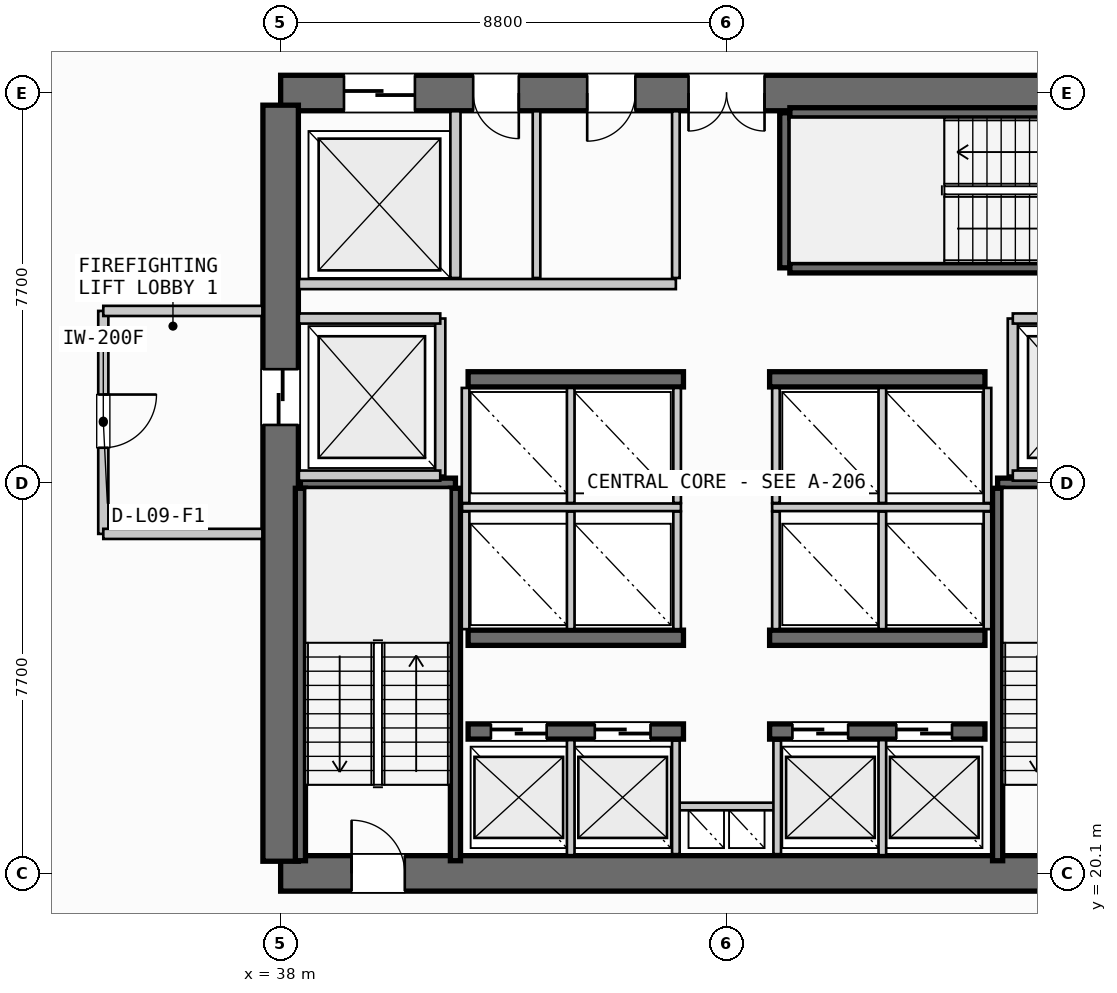
"""IFC4 building model, lengths in metres.
Left out: names, types, materials, properties, quantities, classifications, styles, units other than length and angle.
Written with IfcOpenShell. Run it as: python <this file> out.ifc"""

import sys

from ifc_helpers import new_model, si_unit, direction, frame, frame_2d, origin, place, context, subcontext, project, spatial, rectangle, extrude, source, transform, mapped, element, fill, save


model = new_model("IFC4")
c1 = context("Model", 3, precision=1e-05, world=origin(), true_north=direction((0.0, 1.0)))
c2 = subcontext(c1, "Body", "Model", "MODEL_VIEW")
j1 = project(units=[si_unit("LENGTHUNIT", "METRE"), si_unit("PLANEANGLEUNIT", "RADIAN")], contexts=[c1])
p1 = place(None, origin())
s1 = spatial("IfcSite", under=j1, at=p1, CompositionType="ELEMENT")
p2 = place(p1, origin())
s2 = spatial("IfcBuilding", under=s1, at=p2, CompositionType="ELEMENT")
p3 = place(p2, frame((0.0, 0.0, 41.0)))
s3 = spatial("IfcBuildingStorey", under=s2, at=p3, CompositionType="ELEMENT", Elevation=41.0)
p4 = place(p3, frame((38.0, 20.1, 0.0), z_axis=(0.0, 0.0, 1.0), x_axis=(1.0, 0.0, 0.0)))
e1 = element("IfcWall", 1, at=p4, inside=s3, PredefinedType="SHEAR", context=c2, shape_type="SweptSolid", body=[
    extrude(rectangle(XDim=17.6, YDim=0.7, at=frame_2d((8.8, 0.0))), origin(), (0.0, 0.0, 1.0), 3.55),
])
p5 = place(p4, frame((1.4, 0.0, 0.0)))
e2 = element("IfcOpeningElement", 2, at=p5, cuts=e1, PredefinedType="OPENING", context=c2, shape_type="SweptSolid", body=[
    extrude(rectangle(XDim=1.05, YDim=2.15, at=frame_2d((0.525, 1.075))), frame((0.0, 0.36, 0.0), z_axis=(0.0, -1.0, 0.0), x_axis=(1.0, 0.0, 0.0)), (0.0, 0.0, 1.0), 0.72),
])
p6 = place(p4, frame((15.15, 0.0, 0.0)))
e3 = element("IfcOpeningElement", 3, at=p6, cuts=e1, PredefinedType="OPENING", context=c2, shape_type="SweptSolid", body=[
    extrude(rectangle(XDim=1.05, YDim=2.15, at=frame_2d((0.525, 1.075))), frame((0.0, 0.36, 0.0), z_axis=(0.0, -1.0, 0.0), x_axis=(1.0, 0.0, 0.0)), (0.0, 0.0, 1.0), 0.72),
])
p7 = place(p3, frame((55.6, 35.5, 0.0), z_axis=(0.0, 0.0, 1.0), x_axis=(-1.0, 0.0, 0.0)))
e4 = element("IfcWall", 4, at=p7, inside=s3, PredefinedType="SHEAR", context=c2, shape_type="SweptSolid", body=[
    extrude(rectangle(XDim=17.6, YDim=0.7, at=frame_2d((8.8, 0.0))), origin(), (0.0, 0.0, 1.0), 3.55),
])
p8 = place(p7, frame((8.05, 0.0, 0.0)))
e5 = element("IfcOpeningElement", 5, at=p8, cuts=e4, PredefinedType="OPENING", context=c2, shape_type="SweptSolid", body=[
    extrude(rectangle(XDim=1.5, YDim=2.2, at=frame_2d((0.75, 1.1))), frame((0.0, 0.36, 0.0), z_axis=(0.0, -1.0, 0.0), x_axis=(1.0, 0.0, 0.0)), (0.0, 0.0, 1.0), 0.72),
])
p9 = place(p7, frame((14.95, 0.0, 0.0)))
e6 = element("IfcOpeningElement", 6, at=p9, cuts=e4, PredefinedType="OPENING", context=c2, shape_type="SweptSolid", body=[
    extrude(rectangle(XDim=1.4, YDim=2.3, at=frame_2d((0.7, 1.15))), frame((0.0, 0.36, 0.0), z_axis=(0.0, -1.0, 0.0), x_axis=(1.0, 0.0, 0.0)), (0.0, 0.0, 1.0), 0.72),
])
p10 = place(p7, frame((12.9, 0.0, 0.0)))
e7 = element("IfcOpeningElement", 7, at=p10, cuts=e4, PredefinedType="OPENING", context=c2, shape_type="SweptSolid", body=[
    extrude(rectangle(XDim=0.9, YDim=2.15, at=frame_2d((0.45, 1.075))), frame((0.0, 0.36, 0.0), z_axis=(0.0, -1.0, 0.0), x_axis=(1.0, 0.0, 0.0)), (0.0, 0.0, 1.0), 0.72),
])
p11 = place(p7, frame((10.6, 0.0, 0.0)))
e8 = element("IfcOpeningElement", 8, at=p11, cuts=e4, PredefinedType="OPENING", context=c2, shape_type="SweptSolid", body=[
    extrude(rectangle(XDim=0.95, YDim=2.15, at=frame_2d((0.475, 1.075))), frame((0.0, 0.36, 0.0), z_axis=(0.0, -1.0, 0.0), x_axis=(1.0, 0.0, 0.0)), (0.0, 0.0, 1.0), 0.72),
])
p12 = place(p3, frame((38.0, 35.26, 0.0), z_axis=(0.0, 0.0, 1.0), x_axis=(0.0, -1.0, 0.0)))
e9 = element("IfcWall", 9, at=p12, inside=s3, PredefinedType="SHEAR", context=c2, shape_type="SweptSolid", body=[
    extrude(rectangle(XDim=14.92, YDim=0.7, at=frame_2d((7.46, 0.0))), origin(), (0.0, 0.0, 1.0), 3.55),
])
p13 = place(p12, frame((5.21, 0.0, 0.0)))
e10 = element("IfcOpeningElement", 10, at=p13, cuts=e9, PredefinedType="OPENING", context=c2, shape_type="SweptSolid", body=[
    extrude(rectangle(XDim=1.1, YDim=2.2, at=frame_2d((0.55, 1.1))), frame((0.0, 0.36, 0.0), z_axis=(0.0, -1.0, 0.0), x_axis=(1.0, 0.0, 0.0)), (0.0, 0.0, 1.0), 0.72),
])
p14 = place(p3, frame((41.7, 22.9, 0.0), z_axis=(0.0, 0.0, 1.0), x_axis=(1.0, 0.0, 0.0)))
e11 = element("IfcWall", 11, at=p14, inside=s3, PredefinedType="SHEAR", context=c2, shape_type="SweptSolid", body=[
    extrude(rectangle(XDim=4.25, YDim=0.3, at=frame_2d((2.125, 0.0))), origin(), (0.0, 0.0, 1.0), 3.55),
])
p15 = place(p14, frame((0.45, 0.0, 0.0)))
e12 = element("IfcOpeningElement", 12, at=p15, cuts=e11, PredefinedType="OPENING", context=c2, shape_type="SweptSolid", body=[
    extrude(rectangle(XDim=1.1, YDim=2.2, at=frame_2d((0.55, 1.1))), frame((0.0, 0.16, 0.0), z_axis=(0.0, -1.0, 0.0), x_axis=(1.0, 0.0, 0.0)), (0.0, 0.0, 1.0), 0.32),
])
p16 = place(p14, frame((2.5, 0.0, 0.0)))
e13 = element("IfcOpeningElement", 13, at=p16, cuts=e11, PredefinedType="OPENING", context=c2, shape_type="SweptSolid", body=[
    extrude(rectangle(XDim=1.1, YDim=2.2, at=frame_2d((0.55, 1.1))), frame((0.0, 0.16, 0.0), z_axis=(0.0, -1.0, 0.0), x_axis=(1.0, 0.0, 0.0)), (0.0, 0.0, 1.0), 0.32),
])
p17 = place(p3, frame((47.65, 22.9, 0.0), z_axis=(0.0, 0.0, 1.0), x_axis=(1.0, 0.0, 0.0)))
e14 = element("IfcWall", 14, at=p17, inside=s3, PredefinedType="SHEAR", context=c2, shape_type="SweptSolid", body=[
    extrude(rectangle(XDim=4.25, YDim=0.3, at=frame_2d((2.125, 0.0))), origin(), (0.0, 0.0, 1.0), 3.55),
])
p18 = place(p17, frame((0.45, 0.0, 0.0)))
e15 = element("IfcOpeningElement", 15, at=p18, cuts=e14, PredefinedType="OPENING", context=c2, shape_type="SweptSolid", body=[
    extrude(rectangle(XDim=1.1, YDim=2.2, at=frame_2d((0.55, 1.1))), frame((0.0, 0.16, 0.0), z_axis=(0.0, -1.0, 0.0), x_axis=(1.0, 0.0, 0.0)), (0.0, 0.0, 1.0), 0.32),
])
p19 = place(p17, frame((2.5, 0.0, 0.0)))
e16 = element("IfcOpeningElement", 16, at=p19, cuts=e14, PredefinedType="OPENING", context=c2, shape_type="SweptSolid", body=[
    extrude(rectangle(XDim=1.1, YDim=2.2, at=frame_2d((0.55, 1.1))), frame((0.0, 0.16, 0.0), z_axis=(0.0, -1.0, 0.0), x_axis=(1.0, 0.0, 0.0)), (0.0, 0.0, 1.0), 0.32),
])
for number, where, z_axis, x_axis in (
    (17, (41.7, 24.75, 0.0), (0.0, 0.0, 1.0), (1.0, 0.0, 0.0)),
    (18, (47.65, 24.75, 0.0), (0.0, 0.0, 1.0), (1.0, 0.0, 0.0)),
    (19, (41.7, 29.85, 0.0), (0.0, 0.0, 1.0), (1.0, 0.0, 0.0)),
    (20, (47.65, 29.85, 0.0), (0.0, 0.0, 1.0), (1.0, 0.0, 0.0)),
):
    element("IfcWall", number, at=place(p3, frame(where, z_axis=z_axis, x_axis=x_axis)), inside=s3, PredefinedType="SHEAR", context=c2, shape_type="SweptSolid", body=[
        extrude(rectangle(XDim=4.25, YDim=0.3, at=frame_2d((2.125, 0.0))), origin(), (0.0, 0.0, 1.0), 3.55),
    ])
p20 = place(p3, frame((38.39, 27.8, 0.0), z_axis=(0.0, 0.0, 1.0), x_axis=(1.0, 0.0, 0.0)))
e21 = element("IfcWall", 21, at=p20, inside=s3, PredefinedType="SHEAR", context=c2, shape_type="SweptSolid", body=[
    extrude(rectangle(XDim=3.06, YDim=0.2, at=frame_2d((1.53, 0.0))), origin(), (0.0, 0.0, 1.0), 3.55),
])
for number, where, z_axis, x_axis in (
    (22, (41.45, 27.7, 0.0), (0.0, 0.0, 1.0), (0.0, -1.0, 0.0)),
    (23, (38.39, 20.35, 0.0), (0.0, 0.0, 1.0), (0.0, 1.0, 0.0)),
):
    element("IfcWall", number, at=place(p3, frame(where, z_axis=z_axis, x_axis=x_axis)), inside=s3, PredefinedType="SHEAR", context=c2, shape_type="SweptSolid", body=[
        extrude(rectangle(XDim=7.35, YDim=0.2, at=frame_2d((3.675, 0.0))), origin(), (0.0, 0.0, 1.0), 3.55),
    ])
p21 = place(p3, frame((52.15, 27.8, 0.0), z_axis=(0.0, 0.0, 1.0), x_axis=(1.0, 0.0, 0.0)))
e24 = element("IfcWall", 24, at=p21, inside=s3, PredefinedType="SHEAR", context=c2, shape_type="SweptSolid", body=[
    extrude(rectangle(XDim=3.06, YDim=0.2, at=frame_2d((1.53, 0.0))), origin(), (0.0, 0.0, 1.0), 3.55),
])
p22 = place(p3, frame((52.15, 20.35, 0.0), z_axis=(0.0, 0.0, 1.0), x_axis=(0.0, 1.0, 0.0)))
e25 = element("IfcWall", 25, at=p22, inside=s3, PredefinedType="SHEAR", context=c2, shape_type="SweptSolid", body=[
    extrude(rectangle(XDim=7.35, YDim=0.2, at=frame_2d((3.675, 0.0))), origin(), (0.0, 0.0, 1.0), 3.55),
])
p23 = place(p3, frame((47.95, 32.05, 0.0), z_axis=(0.0, 0.0, 1.0), x_axis=(0.0, 1.0, 0.0)))
e26 = element("IfcWall", 26, at=p23, inside=s3, PredefinedType="SHEAR", context=c2, shape_type="SweptSolid", body=[
    extrude(rectangle(XDim=3.06, YDim=0.2, at=frame_2d((1.53, 0.0))), origin(), (0.0, 0.0, 1.0), 3.55),
])
for number, where, z_axis, x_axis in (
    (27, (48.05, 35.11, 0.0), (0.0, 0.0, 1.0), (1.0, 0.0, 0.0)),
    (28, (55.4, 32.05, 0.0), (0.0, 0.0, 1.0), (-1.0, 0.0, 0.0)),
):
    element("IfcWall", number, at=place(p3, frame(where, z_axis=z_axis, x_axis=x_axis)), inside=s3, PredefinedType="SHEAR", context=c2, shape_type="SweptSolid", body=[
        extrude(rectangle(XDim=7.35, YDim=0.2, at=frame_2d((3.675, 0.0))), origin(), (0.0, 0.0, 1.0), 3.55),
    ])
p24 = place(p3, frame((45.8, 21.42, 0.0), z_axis=(0.0, 0.0, 1.0), x_axis=(1.0, 0.0, 0.0)))
e29 = element("IfcWall", 29, at=p24, inside=s3, PredefinedType="PARTITIONING", context=c2, shape_type="SweptSolid", body=[
    extrude(rectangle(XDim=2.0, YDim=0.15, at=frame_2d((1.0, 0.0))), origin(), (0.0, 0.0, 1.0), 2.785),
])
for number, where, z_axis, x_axis in (
    (30, (45.8, 20.48, 0.0), (0.0, 0.0, 1.0), (0.0, 1.0, 0.0)),
    (31, (47.8, 20.48, 0.0), (0.0, 0.0, 1.0), (0.0, 1.0, 0.0)),
):
    element("IfcWall", number, at=place(p3, frame(where, z_axis=z_axis, x_axis=x_axis)), inside=s3, PredefinedType="PARTITIONING", context=c2, shape_type="SweptSolid", body=[
        extrude(rectangle(XDim=2.24, YDim=0.15, at=frame_2d((1.12, 0.0))), origin(), (0.0, 0.0, 1.0), 2.785),
    ])
p25 = place(p3, frame((41.15, 27.95, 0.0), z_axis=(0.0, 0.0, 1.0), x_axis=(0.0, 1.0, 0.0)))
e32 = element("IfcWall", 32, at=p25, inside=s3, PredefinedType="PARTITIONING", context=c2, shape_type="SweptSolid", body=[
    extrude(rectangle(XDim=3.1, YDim=0.2, at=frame_2d((1.55, 0.0))), origin(), (0.0, 0.0, 1.0), 2.785),
])
for number, where, z_axis, x_axis in (
    (33, (38.36, 27.95, 0.0), (0.0, 0.0, 1.0), (1.0, 0.0, 0.0)),
    (34, (38.36, 31.05, 0.0), (0.0, 0.0, 1.0), (1.0, 0.0, 0.0)),
):
    element("IfcWall", number, at=place(p3, frame(where, z_axis=z_axis, x_axis=x_axis)), inside=s3, PredefinedType="PARTITIONING", context=c2, shape_type="SweptSolid", body=[
        extrude(rectangle(XDim=2.79, YDim=0.2, at=frame_2d((1.395, 0.0))), origin(), (0.0, 0.0, 1.0), 2.785),
    ])
p26 = place(p3, frame((34.5, 31.2, 0.0), z_axis=(0.0, 0.0, 1.0), x_axis=(0.0, -1.0, 0.0)))
e35 = element("IfcWall", 35, at=p26, inside=s3, PredefinedType="PARTITIONING", context=c2, shape_type="SweptSolid", body=[
    extrude(rectangle(XDim=4.4, YDim=0.2, at=frame_2d((2.2, 0.0))), origin(), (0.0, 0.0, 1.0), 2.785),
])
p27 = place(p26, frame((1.65, 0.0, 0.0)))
e36 = element("IfcOpeningElement", 36, at=p27, cuts=e35, PredefinedType="OPENING", context=c2, shape_type="SweptSolid", body=[
    extrude(rectangle(XDim=1.05, YDim=2.15, at=frame_2d((0.525, 1.075))), frame((0.0, 0.11, 0.0), z_axis=(0.0, -1.0, 0.0), x_axis=(1.0, 0.0, 0.0)), (0.0, 0.0, 1.0), 0.22),
])
for number, where, z_axis, x_axis in (
    (37, (34.5, 26.8, 0.0), (0.0, 0.0, 1.0), (1.0, 0.0, 0.0)),
    (38, (34.5, 31.2, 0.0), (0.0, 0.0, 1.0), (1.0, 0.0, 0.0)),
):
    element("IfcWall", number, at=place(p3, frame(where, z_axis=z_axis, x_axis=x_axis)), inside=s3, PredefinedType="PARTITIONING", context=c2, shape_type="SweptSolid", body=[
        extrude(rectangle(XDim=3.14, YDim=0.2, at=frame_2d((1.57, 0.0))), origin(), (0.0, 0.0, 1.0), 2.785),
    ])
p28 = place(p3, frame((52.45, 27.95, 0.0), z_axis=(0.0, 0.0, 1.0), x_axis=(0.0, 1.0, 0.0)))
e39 = element("IfcWall", 39, at=p28, inside=s3, PredefinedType="PARTITIONING", context=c2, shape_type="SweptSolid", body=[
    extrude(rectangle(XDim=3.1, YDim=0.2, at=frame_2d((1.55, 0.0))), origin(), (0.0, 0.0, 1.0), 2.785),
])
for number, where, z_axis, x_axis in (
    (40, (52.45, 27.95, 0.0), (0.0, 0.0, 1.0), (1.0, 0.0, 0.0)),
    (41, (52.45, 31.05, 0.0), (0.0, 0.0, 1.0), (1.0, 0.0, 0.0)),
):
    element("IfcWall", number, at=place(p3, frame(where, z_axis=z_axis, x_axis=x_axis)), inside=s3, PredefinedType="PARTITIONING", context=c2, shape_type="SweptSolid", body=[
        extrude(rectangle(XDim=2.79, YDim=0.2, at=frame_2d((1.395, 0.0))), origin(), (0.0, 0.0, 1.0), 2.785),
    ])
for number, where, z_axis, x_axis in (
    (42, (43.725, 20.46, 0.0), (0.0, 0.0, 1.0), (0.0, 1.0, 0.0)),
    (43, (49.875, 20.46, 0.0), (0.0, 0.0, 1.0), (0.0, 1.0, 0.0)),
):
    element("IfcWall", number, at=place(p3, frame(where, z_axis=z_axis, x_axis=x_axis)), inside=s3, PredefinedType="PARTITIONING", context=c2, shape_type="SweptSolid", body=[
        extrude(rectangle(XDim=2.27, YDim=0.15, at=frame_2d((1.135, 0.0))), origin(), (0.0, 0.0, 1.0), 2.785),
    ])
p29 = place(p3, frame((41.58, 27.325, 0.0), z_axis=(0.0, 0.0, 1.0), x_axis=(1.0, 0.0, 0.0)))
e44 = element("IfcWall", 44, at=p29, inside=s3, PredefinedType="PARTITIONING", context=c2, shape_type="SweptSolid", body=[
    extrude(rectangle(XDim=4.32, YDim=0.15, at=frame_2d((2.16, 0.0))), origin(), (0.0, 0.0, 1.0), 2.785),
])
p30 = place(p3, frame((47.7, 27.325, 0.0), z_axis=(0.0, 0.0, 1.0), x_axis=(1.0, 0.0, 0.0)))
e45 = element("IfcWall", 45, at=p30, inside=s3, PredefinedType="PARTITIONING", context=c2, shape_type="SweptSolid", body=[
    extrude(rectangle(XDim=4.32, YDim=0.15, at=frame_2d((2.16, 0.0))), origin(), (0.0, 0.0, 1.0), 2.785),
])
for number, where, z_axis, x_axis in (
    (46, (41.65, 24.92, 0.0), (0.0, 0.0, 1.0), (0.0, 1.0, 0.0)),
    (47, (43.725, 24.92, 0.0), (0.0, 0.0, 1.0), (0.0, 1.0, 0.0)),
    (48, (45.825, 24.92, 0.0), (0.0, 0.0, 1.0), (0.0, 1.0, 0.0)),
    (49, (47.775, 24.92, 0.0), (0.0, 0.0, 1.0), (0.0, 1.0, 0.0)),
    (50, (49.875, 24.92, 0.0), (0.0, 0.0, 1.0), (0.0, 1.0, 0.0)),
    (51, (51.95, 24.92, 0.0), (0.0, 0.0, 1.0), (0.0, 1.0, 0.0)),
):
    element("IfcWall", number, at=place(p3, frame(where, z_axis=z_axis, x_axis=x_axis)), inside=s3, PredefinedType="PARTITIONING", context=c2, shape_type="SweptSolid", body=[
        extrude(rectangle(XDim=2.32, YDim=0.15, at=frame_2d((1.16, 0.0))), origin(), (0.0, 0.0, 1.0), 2.785),
    ])
for number, where, z_axis, x_axis in (
    (52, (41.65, 27.41, 0.0), (0.0, 0.0, 1.0), (0.0, 1.0, 0.0)),
    (53, (43.725, 27.41, 0.0), (0.0, 0.0, 1.0), (0.0, 1.0, 0.0)),
    (54, (45.825, 27.41, 0.0), (0.0, 0.0, 1.0), (0.0, 1.0, 0.0)),
    (55, (47.775, 27.41, 0.0), (0.0, 0.0, 1.0), (0.0, 1.0, 0.0)),
    (56, (49.875, 27.41, 0.0), (0.0, 0.0, 1.0), (0.0, 1.0, 0.0)),
    (57, (51.95, 27.41, 0.0), (0.0, 0.0, 1.0), (0.0, 1.0, 0.0)),
):
    element("IfcWall", number, at=place(p3, frame(where, z_axis=z_axis, x_axis=x_axis)), inside=s3, PredefinedType="PARTITIONING", context=c2, shape_type="SweptSolid", body=[
        extrude(rectangle(XDim=2.27, YDim=0.15, at=frame_2d((1.135, 0.0))), origin(), (0.0, 0.0, 1.0), 2.785),
    ])
p31 = place(p3, frame((41.45, 31.85, 0.0), z_axis=(0.0, 0.0, 1.0), x_axis=(0.0, 1.0, 0.0)))
e58 = element("IfcWall", 58, at=p31, inside=s3, PredefinedType="PARTITIONING", context=c2, shape_type="SweptSolid", body=[
    extrude(rectangle(XDim=3.29, YDim=0.2, at=frame_2d((1.645, 0.0))), origin(), (0.0, 0.0, 1.0), 2.785),
])
p32 = place(p3, frame((38.36, 31.73, 0.0), z_axis=(0.0, 0.0, 1.0), x_axis=(1.0, 0.0, 0.0)))
e59 = element("IfcWall", 59, at=p32, inside=s3, PredefinedType="PARTITIONING", context=c2, shape_type="SweptSolid", body=[
    extrude(rectangle(XDim=7.44, YDim=0.2, at=frame_2d((3.72, 0.0))), origin(), (0.0, 0.0, 1.0), 2.785),
])
p33 = place(p3, frame((45.8, 31.85, 0.0), z_axis=(0.0, 0.0, 1.0), x_axis=(0.0, 1.0, 0.0)))
e60 = element("IfcWall", 60, at=p33, inside=s3, PredefinedType="PARTITIONING", context=c2, shape_type="SweptSolid", body=[
    extrude(rectangle(XDim=3.29, YDim=0.15, at=frame_2d((1.645, 0.0))), origin(), (0.0, 0.0, 1.0), 2.785),
])
p34 = place(p3, frame((43.05, 31.85, 0.0), z_axis=(0.0, 0.0, 1.0), x_axis=(0.0, 1.0, 0.0)))
e61 = element("IfcWall", 61, at=p34, inside=s3, PredefinedType="PLUMBINGWALL", context=c2, shape_type="SweptSolid", body=[
    extrude(rectangle(XDim=3.29, YDim=0.15, at=frame_2d((1.645, 0.0))), origin(), (0.0, 0.0, 1.0), 2.785),
])
m1 = source(origin(), c2, "Body", "SweptSolid", [
    extrude(rectangle(XDim=1.05, YDim=2.15, at=frame_2d((0.525, 1.075))), frame((0.0, 0.025, 0.0), z_axis=(0.0, -1.0, 0.0), x_axis=(1.0, 0.0, 0.0)), (0.0, 0.0, 1.0), 0.05),
])
p35 = place(p5, origin())
e62 = element("IfcDoor", 62, at=p35, inside=s3, OperationType="SINGLE_SWING_LEFT", PredefinedType="DOOR", context=c2, shape_type="MappedRepresentation", body=[
    mapped(m1, transform((0.0, 0.0, 0.0), scale=1.0)),
])
fill(e2, e62)
m2 = source(origin(), c2, "Body", "SweptSolid", [
    extrude(rectangle(XDim=1.5, YDim=2.2, at=frame_2d((0.75, 1.1))), frame((0.0, 0.025, 0.0), z_axis=(0.0, -1.0, 0.0), x_axis=(1.0, 0.0, 0.0)), (0.0, 0.0, 1.0), 0.05),
])
p36 = place(p8, origin())
e63 = element("IfcDoor", 63, at=p36, inside=s3, OperationType="DOUBLE_DOOR_SINGLE_SWING", PredefinedType="DOOR", context=c2, shape_type="MappedRepresentation", body=[
    mapped(m2, transform((0.0, 0.0, 0.0), scale=1.0)),
])
fill(e5, e63)
m3 = source(origin(), c2, "Body", "SweptSolid", [
    extrude(rectangle(XDim=1.1, YDim=2.2, at=frame_2d((0.55, 1.1))), frame((0.0, 0.025, 0.0), z_axis=(0.0, -1.0, 0.0), x_axis=(1.0, 0.0, 0.0)), (0.0, 0.0, 1.0), 0.05),
])
p37 = place(p13, origin())
e64 = element("IfcDoor", 64, at=p37, inside=s3, OperationType="SLIDING_TO_LEFT", PredefinedType="DOOR", context=c2, shape_type="MappedRepresentation", body=[
    mapped(m3, transform((0.0, 0.0, 0.0), scale=1.0)),
])
fill(e10, e64)
p38 = place(p15, origin())
e65 = element("IfcDoor", 65, at=p38, inside=s3, OperationType="SLIDING_TO_LEFT", PredefinedType="DOOR", context=c2, shape_type="MappedRepresentation", body=[
    mapped(m3, transform((0.0, 0.0, 0.0), scale=1.0)),
])
fill(e12, e65)
p39 = place(p16, origin())
e66 = element("IfcDoor", 66, at=p39, inside=s3, OperationType="SLIDING_TO_LEFT", PredefinedType="DOOR", context=c2, shape_type="MappedRepresentation", body=[
    mapped(m3, transform((0.0, 0.0, 0.0), scale=1.0)),
])
fill(e13, e66)
p40 = place(p18, origin())
e67 = element("IfcDoor", 67, at=p40, inside=s3, OperationType="SLIDING_TO_LEFT", PredefinedType="DOOR", context=c2, shape_type="MappedRepresentation", body=[
    mapped(m3, transform((0.0, 0.0, 0.0), scale=1.0)),
])
fill(e15, e67)
p41 = place(p19, origin())
e68 = element("IfcDoor", 68, at=p41, inside=s3, OperationType="SLIDING_TO_LEFT", PredefinedType="DOOR", context=c2, shape_type="MappedRepresentation", body=[
    mapped(m3, transform((0.0, 0.0, 0.0), scale=1.0)),
])
fill(e16, e68)
m4 = source(origin(), c2, "Body", "SweptSolid", [
    extrude(rectangle(XDim=1.4, YDim=2.3, at=frame_2d((0.7, 1.15))), frame((0.0, 0.025, 0.0), z_axis=(0.0, -1.0, 0.0), x_axis=(1.0, 0.0, 0.0)), (0.0, 0.0, 1.0), 0.05),
])
p42 = place(p9, origin())
e69 = element("IfcDoor", 69, at=p42, inside=s3, OperationType="SLIDING_TO_RIGHT", PredefinedType="DOOR", context=c2, shape_type="MappedRepresentation", body=[
    mapped(m4, transform((0.0, 0.0, 0.0), scale=1.0)),
])
fill(e6, e69)
m5 = source(origin(), c2, "Body", "SweptSolid", [
    extrude(rectangle(XDim=0.9, YDim=2.15, at=frame_2d((0.45, 1.075))), frame((0.0, 0.025, 0.0), z_axis=(0.0, -1.0, 0.0), x_axis=(1.0, 0.0, 0.0)), (0.0, 0.0, 1.0), 0.05),
])
p43 = place(p10, origin())
e70 = element("IfcDoor", 70, at=p43, inside=s3, OperationType="SINGLE_SWING_LEFT", PredefinedType="DOOR", context=c2, shape_type="MappedRepresentation", body=[
    mapped(m5, transform((0.0, 0.0, 0.0), scale=1.0)),
])
fill(e7, e70)
m6 = source(origin(), c2, "Body", "SweptSolid", [
    extrude(rectangle(XDim=0.95, YDim=2.15, at=frame_2d((0.475, 1.075))), frame((0.0, 0.025, 0.0), z_axis=(0.0, -1.0, 0.0), x_axis=(1.0, 0.0, 0.0)), (0.0, 0.0, 1.0), 0.05),
])
p44 = place(p11, origin())
e71 = element("IfcDoor", 71, at=p44, inside=s3, OperationType="SINGLE_SWING_RIGHT", PredefinedType="DOOR", context=c2, shape_type="MappedRepresentation", body=[
    mapped(m6, transform((0.0, 0.0, 0.0), scale=1.0)),
])
fill(e8, e71)
p45 = place(p27, origin())
e72 = element("IfcDoor", 72, at=p45, inside=s3, OperationType="SINGLE_SWING_LEFT", PredefinedType="DOOR", context=c2, shape_type="MappedRepresentation", body=[
    mapped(m1, transform((0.0, 0.0, 0.0), scale=1.0)),
])
fill(e36, e72)
save(model, sys.argv[1])
